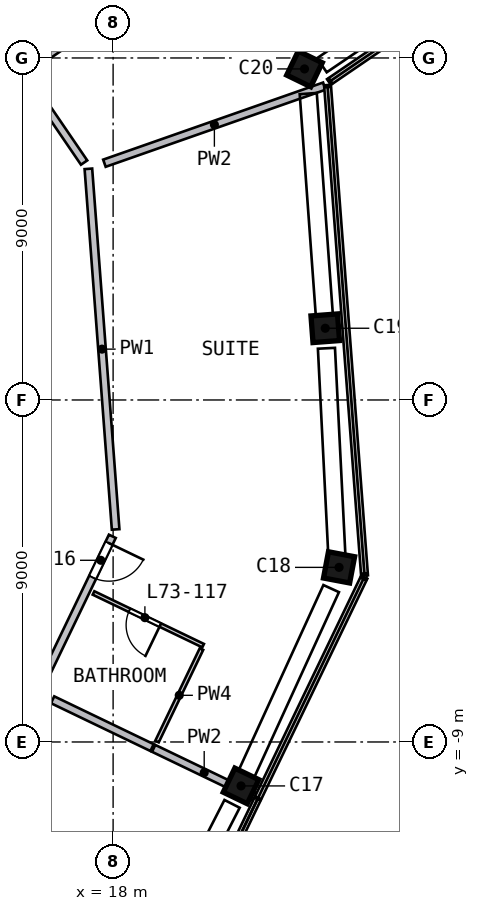
"""IFC4 building model, lengths in metres.
Left out: names, types, materials, properties, quantities, classifications, styles, units other than length and angle.
Written with IfcOpenShell. Run it as: python <this file> out.ifc"""

import sys

from ifc_helpers import new_model, si_unit, direction, frame, frame_2d, origin, origin_2d, place, context, subcontext, project, spatial, rectangle, extrude, element, fill, save


model = new_model("IFC4")
c1 = context("Model", 3, precision=1e-05, world=origin(), true_north=direction((0.0, 1.0)))
c2 = subcontext(c1, "Body", "Model", "MODEL_VIEW")
j1 = project(units=[si_unit("LENGTHUNIT", "METRE"), si_unit("PLANEANGLEUNIT", "RADIAN")], contexts=[c1])
p1 = place(None, origin())
s1 = spatial("IfcSite", under=j1, at=p1, CompositionType="ELEMENT")
p2 = place(p1, origin())
s2 = spatial("IfcBuilding", under=s1, at=p2, CompositionType="ELEMENT")
p3 = place(p2, frame((0.0, 0.0, 295.0)))
s3 = spatial("IfcBuildingStorey", under=s2, at=p3, CompositionType="ELEMENT", Elevation=295.0)
p4 = place(p3, frame((21.322, -10.252, 0.0), z_axis=(0.037379974, 0.079403422, 0.996141473), x_axis=(0.43187559, 0.897653527, -0.08775888)))
e1 = element("IfcColumn", 1, at=p4, inside=s3, PredefinedType="COLUMN", context=c2, shape_type="SweptSolid", body=[
    extrude(rectangle(XDim=0.7, YDim=0.7, at=origin_2d()), origin(), (0.0, 0.0, 1.0), 4.206),
])
p5 = place(p3, frame((23.926, -4.512, 0.0), z_axis=(0.015958359, 0.088844536, 0.995917657), x_axis=(-0.184343741, -0.978708302, 0.090263194)))
e2 = element("IfcColumn", 2, at=p5, inside=s3, PredefinedType="COLUMN", context=c2, shape_type="SweptSolid", body=[
    extrude(rectangle(XDim=0.7, YDim=0.7, at=origin_2d()), origin(), (0.0, 0.0, 1.0), 4.207),
])
p6 = place(p3, frame((23.591, 1.782, 0.0), z_axis=(-0.007313464, 0.087471347, 0.996140189), x_axis=(-0.074613173, 0.993342185, -0.087773449)))
e3 = element("IfcColumn", 3, at=p6, inside=s3, PredefinedType="COLUMN", context=c2, shape_type="SweptSolid", body=[
    extrude(rectangle(XDim=0.7, YDim=0.7, at=origin_2d()), origin(), (0.0, 0.0, 1.0), 4.206),
])
p7 = place(p3, frame((23.075, 8.609, 0.0), z_axis=(-0.032667907, 0.085296312, 0.995819937), x_axis=(-0.435988525, -0.897772692, 0.06259552)))
e4 = element("IfcColumn", 4, at=p7, inside=s3, PredefinedType="COLUMN", context=c2, shape_type="SweptSolid", body=[
    extrude(rectangle(XDim=0.7, YDim=0.7, at=origin_2d()), origin(), (0.0, 0.0, 1.0), 4.208),
])
p8 = place(p3, frame((12.097, 13.777, 0.0), z_axis=(0.0, 0.0, 1.0), x_axis=(0.563825338, -0.825894054, 0.0)))
e5 = element("IfcWall", 5, at=p8, inside=s3, PredefinedType="SOLIDWALL", context=c2, shape_type="SweptSolid", body=[
    extrude(rectangle(XDim=9.116, YDim=0.2, at=frame_2d((4.558, 0.0))), origin(), (0.0, 0.0, 1.0), 4.19),
])
p9 = place(p8, frame((3.657, 0.0, 0.0)))
e6 = element("IfcOpeningElement", 6, at=p9, cuts=e5, PredefinedType="OPENING", context=c2, shape_type="SweptSolid", body=[
    extrude(rectangle(XDim=1.8, YDim=2.1, at=frame_2d((0.9, 1.05))), frame((0.0, 0.11, 0.0), z_axis=(0.0, -1.0, 0.0), x_axis=(1.0, 0.0, 0.0)), (0.0, 0.0, 1.0), 0.22),
])
p10 = place(p3, frame((17.979, -3.588, 0.0), z_axis=(0.0, 0.0, 1.0), x_axis=(-0.433350913, -0.90122527, 0.0)))
e7 = element("IfcWall", 7, at=p10, inside=s3, PredefinedType="SOLIDWALL", context=c2, shape_type="SweptSolid", body=[
    extrude(rectangle(XDim=9.115, YDim=0.2, at=frame_2d((4.558, 0.0))), origin(), (0.0, 0.0, 1.0), 4.19),
])
p11 = place(p10, frame((0.2, 0.0, 0.0)))
e8 = element("IfcOpeningElement", 8, at=p11, cuts=e7, PredefinedType="OPENING", context=c2, shape_type="SweptSolid", body=[
    extrude(rectangle(XDim=1.0, YDim=2.1, at=frame_2d((0.5, 1.05))), frame((0.0, 0.11, 0.0), z_axis=(0.0, -1.0, 0.0), x_axis=(1.0, 0.0, 0.0)), (0.0, 0.0, 1.0), 0.22),
])
p12 = place(p3, frame((18.066, -3.406, 0.0), z_axis=(0.0, 0.0, 1.0), x_axis=(-0.075325055, 0.997159032, 0.0)))
e9 = element("IfcWall", 9, at=p12, inside=s3, PredefinedType="SOLIDWALL", context=c2, shape_type="SweptSolid", body=[
    extrude(rectangle(XDim=9.516, YDim=0.2, at=frame_2d((4.758, 0.0))), origin(), (0.0, 0.0, 1.0), 4.19),
])
p13 = place(p3, frame((16.407, -7.889, 0.0), z_axis=(0.0, 0.0, 1.0), x_axis=(0.901246112, -0.433307565, 0.0)))
e10 = element("IfcWall", 10, at=p13, inside=s3, PredefinedType="SOLIDWALL", context=c2, shape_type="SweptSolid", body=[
    extrude(rectangle(XDim=2.905, YDim=0.2, at=frame_2d((1.452, 0.0))), origin(), (0.0, 0.0, 1.0), 4.19),
])
p14 = place(p3, frame((24.251, 14.51, 0.0), z_axis=(0.0, 0.0, 1.0), x_axis=(-0.825903758, -0.563811123, 0.0)))
e11 = element("IfcWall", 11, at=p14, inside=s3, PredefinedType="SOLIDWALL", context=c2, shape_type="SweptSolid", body=[
    extrude(rectangle(XDim=10.252, YDim=0.2, at=frame_2d((5.126, 0.0))), origin(), (0.0, 0.0, 1.0), 4.19),
])
p15 = place(p14, frame((2.45, 0.0, 0.0)))
e12 = element("IfcOpeningElement", 12, at=p15, cuts=e11, PredefinedType="OPENING", context=c2, shape_type="SweptSolid", body=[
    extrude(rectangle(XDim=1.0, YDim=2.1, at=frame_2d((0.5, 1.05))), frame((0.0, 0.11, 0.0), z_axis=(0.0, -1.0, 0.0), x_axis=(1.0, 0.0, 0.0)), (0.0, 0.0, 1.0), 0.22),
])
p16 = place(p3, frame((19.067, -9.168, 0.0), z_axis=(0.0, 0.0, 1.0), x_axis=(0.901218262, -0.433365485, 0.0)))
e13 = element("IfcWall", 13, at=p16, inside=s3, PredefinedType="SOLIDWALL", context=c2, shape_type="SweptSolid", body=[
    extrude(rectangle(XDim=2.952, YDim=0.2, at=frame_2d((1.476, 0.0))), origin(), (0.0, 0.0, 1.0), 4.19),
])
p17 = place(p3, frame((23.558, 8.259, 0.0), z_axis=(0.0, 0.0, 1.0), x_axis=(-0.943680696, -0.330857589, 0.0)))
e14 = element("IfcWall", 14, at=p17, inside=s3, PredefinedType="SOLIDWALL", context=c2, shape_type="SweptSolid", body=[
    extrude(rectangle(XDim=6.132, YDim=0.2, at=frame_2d((3.066, 0.0))), origin(), (0.0, 0.0, 1.0), 4.19),
])
p18 = place(p3, frame((20.368, -6.465, 0.0), z_axis=(0.0, 0.0, 1.0), x_axis=(-0.901247841, 0.433303969, 0.0)))
e15 = element("IfcWall", 15, at=p18, inside=s3, PredefinedType="PARTITIONING", context=c2, shape_type="SweptSolid", body=[
    extrude(rectangle(XDim=3.2, YDim=0.1, at=frame_2d((1.6, 0.0))), origin(), (0.0, 0.0, 1.0), 4.19),
])
p19 = place(p18, frame((1.25, 0.0, 0.0)))
e16 = element("IfcOpeningElement", 16, at=p19, cuts=e15, PredefinedType="OPENING", context=c2, shape_type="SweptSolid", body=[
    extrude(rectangle(XDim=0.9, YDim=2.1, at=frame_2d((0.45, 1.05))), frame((0.0, 0.06, 0.0), z_axis=(0.0, -1.0, 0.0), x_axis=(1.0, 0.0, 0.0)), (0.0, 0.0, 1.0), 0.12),
])
p20 = place(p3, frame((20.325, -6.555, 0.0), z_axis=(0.0, 0.0, 1.0), x_axis=(-0.433342461, -0.901229333, 0.0)))
e17 = element("IfcWall", 17, at=p20, inside=s3, PredefinedType="PARTITIONING", context=c2, shape_type="SweptSolid", body=[
    extrude(rectangle(XDim=2.7, YDim=0.1, at=frame_2d((1.35, 0.0))), origin(), (0.0, 0.0, 1.0), 4.19),
])
p21 = place(p11, origin())
e18 = element("IfcDoor", 18, at=p21, inside=s3, OperationType="SINGLE_SWING_LEFT", PredefinedType="DOOR", context=c2, shape_type="SweptSolid", body=[
    extrude(rectangle(XDim=1.0, YDim=2.1, at=frame_2d((0.5, 1.05))), frame((0.0, 0.025, 0.0), z_axis=(0.0, -1.0, 0.0), x_axis=(1.0, 0.0, 0.0)), (0.0, 0.0, 1.0), 0.05),
])
fill(e8, e18)
p22 = place(p19, origin())
e19 = element("IfcDoor", 19, at=p22, inside=s3, OperationType="SINGLE_SWING_LEFT", PredefinedType="DOOR", context=c2, shape_type="SweptSolid", body=[
    extrude(rectangle(XDim=0.9, YDim=2.1, at=frame_2d((0.45, 1.05))), frame((0.0, 0.025, 0.0), z_axis=(0.0, -1.0, 0.0), x_axis=(1.0, 0.0, 0.0)), (0.0, 0.0, 1.0), 0.05),
])
fill(e16, e19)
save(model, sys.argv[1])
